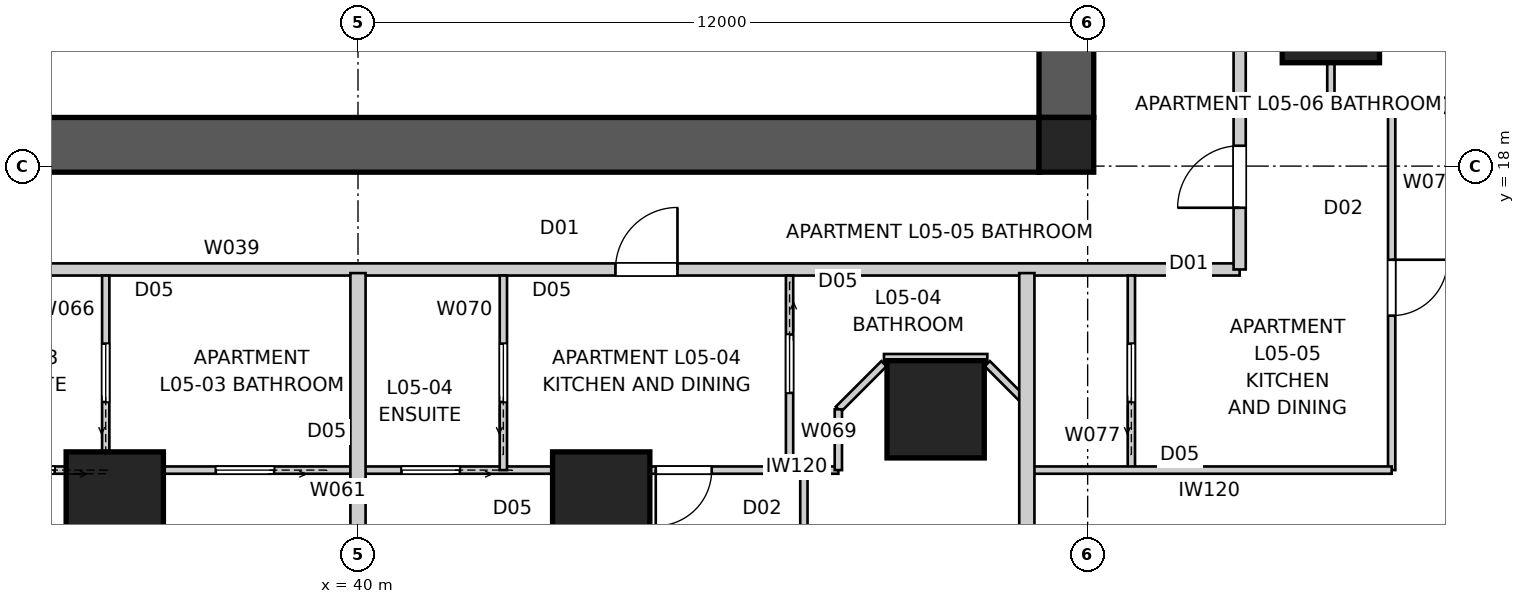
"""IFC4 building model, lengths in metres.
Left out: names, types, materials, properties, quantities, classifications, styles, units other than length and angle.
Written with IfcOpenShell. Run it as: python <this file> out.ifc"""

import sys

from ifc_helpers import new_model, si_unit, direction, frame, frame_2d, origin, origin_2d, place, context, subcontext, project, spatial, polyline, rectangle, outline, extrude, element, fill, save


model = new_model("IFC4")
c1 = context("Model", 3, precision=1e-05, world=origin(), true_north=direction((0.0, 1.0)))
c2 = subcontext(c1, "Body", "Model", "MODEL_VIEW")
j1 = project(units=[si_unit("LENGTHUNIT", "METRE"), si_unit("PLANEANGLEUNIT", "RADIAN")], contexts=[c1])
p1 = place(None, origin())
s1 = spatial("IfcSite", under=j1, at=p1, CompositionType="ELEMENT")
p2 = place(p1, origin())
s2 = spatial("IfcBuilding", under=s1, at=p2, CompositionType="ELEMENT")
p3 = place(p2, frame((0.0, 0.0, 21.8)))
s3 = spatial("IfcBuildingStorey", under=s2, at=p3, CompositionType="ELEMENT", Elevation=21.8)
p4 = place(p3, frame((51.2, 18.35, 0.0), z_axis=(0.0, 0.0, 1.0), x_axis=(-1.0, 0.0, 0.0)))
e1 = element("IfcWall", 1, at=p4, inside=s3, PredefinedType="SHEAR", context=c2, shape_type="SweptSolid", body=[
    extrude(outline(polyline([(0.0, -0.45), (22.4, -0.45), (22.4, -0.025), (22.85, -0.025), (22.85, 0.025), (22.4, 0.025), (22.4, 0.45), (0.0, 0.45), (0.0, 0.025), (-0.45, 0.025), (-0.45, -0.025), (0.0, -0.025), (0.0, -0.45)])), origin(), (0.0, 0.0, 1.0), 3.4),
])
p5 = place(p3, frame((51.65, 18.8, 0.0), z_axis=(0.0, 0.0, 1.0), x_axis=(0.0, 1.0, 0.0)))
e2 = element("IfcWall", 2, at=p5, inside=s3, PredefinedType="SHEAR", context=c2, shape_type="SweptSolid", body=[
    extrude(outline(polyline([(0.0, -0.45), (22.4, -0.45), (22.4, -0.025), (22.85, -0.025), (22.85, 0.025), (22.4, 0.025), (22.4, 0.45), (0.0, 0.45), (0.0, 0.025), (-0.45, 0.025), (-0.45, -0.025), (0.0, -0.025), (0.0, -0.45)])), origin(), (0.0, 0.0, 1.0), 3.4),
])
p6 = place(p5, frame((11.14, 0.0, 0.0)))
e3 = element("IfcOpeningElement", 3, at=p6, cuts=e2, PredefinedType="OPENING", context=c2, shape_type="SweptSolid", body=[
    extrude(rectangle(XDim=1.02, YDim=2.4, at=frame_2d((0.51, 1.2))), frame((0.0, 0.46, 0.0), z_axis=(0.0, -1.0, 0.0), x_axis=(1.0, 0.0, 0.0)), (0.0, 0.0, 1.0), 0.92),
])
p7 = place(p3, frame((51.65, 18.35, 0.0), z_axis=(0.0, 0.0, 1.0), x_axis=(1.0, 0.0, 0.0)))
e4 = element("IfcColumn", 4, at=p7, inside=s3, PredefinedType="COLUMN", context=c2, shape_type="SweptSolid", body=[
    extrude(rectangle(XDim=0.9, YDim=0.9, at=origin_2d()), origin(), (0.0, 0.0, 1.0), 3.4),
])
for number, where, z_axis, x_axis in (
    (5, (36.0, 12.5, 0.0), (0.0, 0.0, 1.0), (1.0, 0.0, 0.0)),
    (6, (44.0, 12.5, 0.0), (0.0, 0.0, 1.0), (1.0, 0.0, 0.0)),
    (7, (49.5, 14.0, 0.0), (0.0, 0.0, 1.0), (1.0, 0.0, 0.0)),
    (8, (56.0, 20.5, 0.0), (0.0, 0.0, 1.0), (1.0, 0.0, 0.0)),
):
    element("IfcColumn", number, at=place(p3, frame(where, z_axis=z_axis, x_axis=x_axis)), inside=s3, PredefinedType="COLUMN", context=c2, shape_type="SweptSolid", body=[
        extrude(rectangle(XDim=1.6, YDim=1.6, at=origin_2d()), origin(), (0.0, 0.0, 1.0), 3.4),
    ])
p8 = place(p3, frame((25.5, 16.3, 0.0), z_axis=(0.0, 0.0, 1.0), x_axis=(1.0, 0.0, 0.0)))
e9 = element("IfcWall", 9, at=p8, inside=s3, PredefinedType="PARTITIONING", context=c2, shape_type="SweptSolid", body=[
    extrude(rectangle(XDim=29.0, YDim=0.2, at=frame_2d((14.5, 0.0))), origin(), (0.0, 0.0, 1.0), 3.25),
])
p9 = place(p8, frame((18.734, 0.0, 0.0)))
e10 = element("IfcOpeningElement", 10, at=p9, cuts=e9, PredefinedType="OPENING", context=c2, shape_type="SweptSolid", body=[
    extrude(rectangle(XDim=1.02, YDim=2.34, at=frame_2d((0.51, 1.17))), frame((0.0, 0.11, 0.0), z_axis=(0.0, -1.0, 0.0), x_axis=(1.0, 0.0, 0.0)), (0.0, 0.0, 1.0), 0.22),
])
p10 = place(p8, frame((5.096, 0.0, 0.0)))
e11 = element("IfcOpeningElement", 11, at=p10, cuts=e9, PredefinedType="OPENING", context=c2, shape_type="SweptSolid", body=[
    extrude(rectangle(XDim=1.02, YDim=2.34, at=frame_2d((0.51, 1.17))), frame((0.0, 0.11, 0.0), z_axis=(0.0, -1.0, 0.0), x_axis=(1.0, 0.0, 0.0)), (0.0, 0.0, 1.0), 0.22),
])
p11 = place(p3, frame((54.5, 16.3, 0.0), z_axis=(0.0, 0.0, 1.0), x_axis=(0.0, 1.0, 0.0)))
e12 = element("IfcWall", 12, at=p11, inside=s3, PredefinedType="PARTITIONING", context=c2, shape_type="SweptSolid", body=[
    extrude(rectangle(XDim=27.4, YDim=0.2, at=frame_2d((13.7, 0.0))), origin(), (0.0, 0.0, 1.0), 3.25),
])
p12 = place(p11, frame((20.998, 0.0, 0.0)))
e13 = element("IfcOpeningElement", 13, at=p12, cuts=e12, PredefinedType="OPENING", context=c2, shape_type="SweptSolid", body=[
    extrude(rectangle(XDim=1.02, YDim=2.34, at=frame_2d((0.51, 1.17))), frame((0.0, 0.11, 0.0), z_axis=(0.0, -1.0, 0.0), x_axis=(1.0, 0.0, 0.0)), (0.0, 0.0, 1.0), 0.22),
])
p13 = place(p11, frame((11.119, 0.0, 0.0)))
e14 = element("IfcOpeningElement", 14, at=p13, cuts=e12, PredefinedType="OPENING", context=c2, shape_type="SweptSolid", body=[
    extrude(rectangle(XDim=1.02, YDim=2.34, at=frame_2d((0.51, 1.17))), frame((0.0, 0.11, 0.0), z_axis=(0.0, -1.0, 0.0), x_axis=(1.0, 0.0, 0.0)), (0.0, 0.0, 1.0), 0.22),
])
p14 = place(p11, frame((1.015, 0.0, 0.0)))
e15 = element("IfcOpeningElement", 15, at=p14, cuts=e12, PredefinedType="OPENING", context=c2, shape_type="SweptSolid", body=[
    extrude(rectangle(XDim=1.02, YDim=2.34, at=frame_2d((0.51, 1.17))), frame((0.0, 0.11, 0.0), z_axis=(0.0, -1.0, 0.0), x_axis=(1.0, 0.0, 0.0)), (0.0, 0.0, 1.0), 0.22),
])
p15 = place(p3, frame((40.0, 4.0, 0.0), z_axis=(0.0, 0.0, 1.0), x_axis=(0.0, 1.0, 0.0)))
e16 = element("IfcWall", 16, at=p15, inside=s3, PredefinedType="PARTITIONING", context=c2, shape_type="SweptSolid", body=[
    extrude(rectangle(XDim=8.5, YDim=0.25, at=frame_2d((4.25, 0.0))), origin(), (0.0, 0.0, 1.0), 3.25),
])
p16 = place(p3, frame((40.0, 12.5, 0.0), z_axis=(0.0, 0.0, 1.0), x_axis=(0.0, 1.0, 0.0)))
e17 = element("IfcWall", 17, at=p16, inside=s3, PredefinedType="PARTITIONING", context=c2, shape_type="SweptSolid", body=[
    extrude(rectangle(XDim=3.74, YDim=0.25, at=frame_2d((1.87, 0.0))), origin(), (0.0, 0.0, 1.0), 2.796),
])
p17 = place(p3, frame((51.0, 4.0, 0.0), z_axis=(0.0, 0.0, 1.0), x_axis=(0.0, 1.0, 0.0)))
e18 = element("IfcWall", 18, at=p17, inside=s3, PredefinedType="PARTITIONING", context=c2, shape_type="SweptSolid", body=[
    extrude(rectangle(XDim=12.24, YDim=0.25, at=frame_2d((6.12, 0.0))), origin(), (0.0, 0.0, 1.0), 3.25),
])
p18 = place(p3, frame((66.0, 19.0, 0.0), z_axis=(0.0, 0.0, 1.0), x_axis=(-1.0, 0.0, 0.0)))
e19 = element("IfcWall", 19, at=p18, inside=s3, PredefinedType="PARTITIONING", context=c2, shape_type="SweptSolid", body=[
    extrude(rectangle(XDim=11.44, YDim=0.25, at=frame_2d((5.72, 0.0))), origin(), (0.0, 0.0, 1.0), 3.25),
])
p19 = place(p3, frame((47.9, 13.0, 0.0), z_axis=(0.0, 0.0, 1.0), x_axis=(-1.0, 0.0, 0.0)))
e20 = element("IfcWall", 20, at=p19, inside=s3, PredefinedType="PARTITIONING", context=c2, shape_type="SweptSolid", body=[
    extrude(rectangle(XDim=15.8, YDim=0.12, at=frame_2d((7.9, 0.0))), origin(), (0.0, 0.0, 1.0), 2.549),
])
p20 = place(p19, frame((2.083, 0.0, 0.0)))
e21 = element("IfcOpeningElement", 21, at=p20, cuts=e20, PredefinedType="OPENING", context=c2, shape_type="SweptSolid", body=[
    extrude(rectangle(XDim=0.92, YDim=2.34, at=frame_2d((0.46, 1.17))), frame((0.0, 0.07, 0.0), z_axis=(0.0, -1.0, 0.0), x_axis=(1.0, 0.0, 0.0)), (0.0, 0.0, 1.0), 0.14),
])
p21 = place(p19, frame((6.225, 0.0, 0.0)))
e22 = element("IfcOpeningElement", 22, at=p21, cuts=e20, PredefinedType="OPENING", context=c2, shape_type="SweptSolid", body=[
    extrude(rectangle(XDim=0.96, YDim=2.1, at=frame_2d((0.48, 1.05))), frame((0.0, 0.07, 0.0), z_axis=(0.0, -1.0, 0.0), x_axis=(1.0, 0.0, 0.0)), (0.0, 0.0, 1.0), 0.14),
])
p22 = place(p19, frame((12.888, 0.0, 0.0)))
e23 = element("IfcOpeningElement", 23, at=p22, cuts=e20, PredefinedType="OPENING", context=c2, shape_type="SweptSolid", body=[
    extrude(rectangle(XDim=0.96, YDim=2.1, at=frame_2d((0.48, 1.05))), frame((0.0, 0.07, 0.0), z_axis=(0.0, -1.0, 0.0), x_axis=(1.0, 0.0, 0.0)), (0.0, 0.0, 1.0), 0.14),
])
p23 = place(p19, frame((9.278, 0.0, 0.0)))
e24 = element("IfcOpeningElement", 24, at=p23, cuts=e20, PredefinedType="OPENING", context=c2, shape_type="SweptSolid", body=[
    extrude(rectangle(XDim=0.96, YDim=2.1, at=frame_2d((0.48, 1.05))), frame((0.0, 0.07, 0.0), z_axis=(0.0, -1.0, 0.0), x_axis=(1.0, 0.0, 0.0)), (0.0, 0.0, 1.0), 0.14),
])
p24 = place(p3, frame((35.851, 13.0, 0.0), z_axis=(0.0, 0.0, 1.0), x_axis=(0.0, 1.0, 0.0)))
e25 = element("IfcWall", 25, at=p24, inside=s3, PredefinedType="PARTITIONING", context=c2, shape_type="SweptSolid", body=[
    extrude(rectangle(XDim=3.2, YDim=0.12, at=frame_2d((1.6, 0.0))), origin(), (0.0, 0.0, 1.0), 3.25),
])
p25 = place(p24, frame((1.12, 0.0, 0.0)))
e26 = element("IfcOpeningElement", 26, at=p25, cuts=e25, PredefinedType="OPENING", context=c2, shape_type="SweptSolid", body=[
    extrude(rectangle(XDim=0.96, YDim=2.1, at=frame_2d((0.48, 1.05))), frame((0.0, 0.07, 0.0), z_axis=(0.0, -1.0, 0.0), x_axis=(1.0, 0.0, 0.0)), (0.0, 0.0, 1.0), 0.14),
])
p26 = place(p3, frame((36.333, 4.04, 0.0), z_axis=(0.0, 0.0, 1.0), x_axis=(0.0, 1.0, 0.0)))
e27 = element("IfcWall", 27, at=p26, inside=s3, PredefinedType="PARTITIONING", context=c2, shape_type="SweptSolid", body=[
    extrude(rectangle(XDim=8.96, YDim=0.12, at=frame_2d((4.48, 0.0))), origin(), (0.0, 0.0, 1.0), 3.25),
])
p27 = place(p3, frame((47.098, 16.2, 0.0), z_axis=(0.0, 0.0, 1.0), x_axis=(0.0, -1.0, 0.0)))
e28 = element("IfcWall", 28, at=p27, inside=s3, PredefinedType="PARTITIONING", context=c2, shape_type="SweptSolid", body=[
    extrude(rectangle(XDim=3.2, YDim=0.12, at=frame_2d((1.6, 0.0))), origin(), (0.0, 0.0, 1.0), 3.25),
])
p28 = place(p27, frame((0.97, 0.0, 0.0)))
e29 = element("IfcOpeningElement", 29, at=p28, cuts=e28, PredefinedType="OPENING", context=c2, shape_type="SweptSolid", body=[
    extrude(rectangle(XDim=0.96, YDim=2.1, at=frame_2d((0.48, 1.05))), frame((0.0, 0.07, 0.0), z_axis=(0.0, -1.0, 0.0), x_axis=(1.0, 0.0, 0.0)), (0.0, 0.0, 1.0), 0.14),
])
p29 = place(p3, frame((42.391, 13.0, 0.0), z_axis=(0.0, 0.0, 1.0), x_axis=(0.0, 1.0, 0.0)))
e30 = element("IfcWall", 30, at=p29, inside=s3, PredefinedType="PARTITIONING", context=c2, shape_type="SweptSolid", body=[
    extrude(rectangle(XDim=3.2, YDim=0.12, at=frame_2d((1.6, 0.0))), origin(), (0.0, 0.0, 1.0), 3.25),
])
p30 = place(p29, frame((1.12, 0.0, 0.0)))
e31 = element("IfcOpeningElement", 31, at=p30, cuts=e30, PredefinedType="OPENING", context=c2, shape_type="SweptSolid", body=[
    extrude(rectangle(XDim=0.96, YDim=2.1, at=frame_2d((0.48, 1.05))), frame((0.0, 0.07, 0.0), z_axis=(0.0, -1.0, 0.0), x_axis=(1.0, 0.0, 0.0)), (0.0, 0.0, 1.0), 0.14),
])
p31 = place(p3, frame((51.0, 14.1, 0.0), z_axis=(0.0, 0.0, 1.0), x_axis=(-0.707106781187, 0.707106781187, 0.0)))
e32 = element("IfcWall", 32, at=p31, inside=s3, PredefinedType="PARTITIONING", context=c2, shape_type="SweptSolid", body=[
    extrude(rectangle(XDim=0.919, YDim=0.12, at=frame_2d((0.459, 0.0))), origin(), (0.0, 0.0, 1.0), 3.25),
])
p32 = place(p3, frame((50.35, 14.85, 0.0), z_axis=(0.0, 0.0, 1.0), x_axis=(-1.0, 0.0, 0.0)))
e33 = element("IfcWall", 33, at=p32, inside=s3, PredefinedType="PARTITIONING", context=c2, shape_type="SweptSolid", body=[
    extrude(rectangle(XDim=1.7, YDim=0.12, at=frame_2d((0.85, 0.0))), origin(), (0.0, 0.0, 1.0), 3.25),
])
p33 = place(p3, frame((48.65, 14.75, 0.0), z_axis=(0.0, 0.0, 1.0), x_axis=(-0.707106781187, -0.707106781187, 0.0)))
e34 = element("IfcWall", 34, at=p33, inside=s3, PredefinedType="PARTITIONING", context=c2, shape_type="SweptSolid", body=[
    extrude(rectangle(XDim=1.061, YDim=0.12, at=frame_2d((0.53, 0.0))), origin(), (0.0, 0.0, 1.0), 3.25),
])
p34 = place(p3, frame((47.9, 14.0, 0.0), z_axis=(0.0, 0.0, 1.0), x_axis=(0.0, -1.0, 0.0)))
e35 = element("IfcWall", 35, at=p34, inside=s3, PredefinedType="PARTITIONING", context=c2, shape_type="SweptSolid", body=[
    extrude(rectangle(XDim=1.0, YDim=0.12, at=frame_2d((0.5, 0.0))), origin(), (0.0, 0.0, 1.0), 3.25),
])
p35 = place(p3, frame((43.667, 13.0, 0.0), z_axis=(0.0, 0.0, 1.0), x_axis=(0.0, -1.0, 0.0)))
e36 = element("IfcWall", 36, at=p35, inside=s3, PredefinedType="PARTITIONING", context=c2, shape_type="SweptSolid", body=[
    extrude(rectangle(XDim=8.96, YDim=0.12, at=frame_2d((4.48, 0.0))), origin(), (0.0, 0.0, 1.0), 3.25),
])
p36 = place(p3, frame((47.333, 4.04, 0.0), z_axis=(0.0, 0.0, 1.0), x_axis=(0.0, 1.0, 0.0)))
e37 = element("IfcWall", 37, at=p36, inside=s3, PredefinedType="PARTITIONING", context=c2, shape_type="SweptSolid", body=[
    extrude(rectangle(XDim=8.96, YDim=0.12, at=frame_2d((4.48, 0.0))), origin(), (0.0, 0.0, 1.0), 3.25),
])
p37 = place(p36, frame((4.0, 0.0, 0.0)))
e38 = element("IfcOpeningElement", 38, at=p37, cuts=e37, PredefinedType="OPENING", context=c2, shape_type="SweptSolid", body=[
    extrude(rectangle(XDim=0.92, YDim=2.34, at=frame_2d((0.46, 1.17))), frame((0.0, 0.07, 0.0), z_axis=(0.0, -1.0, 0.0), x_axis=(1.0, 0.0, 0.0)), (0.0, 0.0, 1.0), 0.14),
])
p38 = place(p3, frame((52.719, 13.0, 0.0), z_axis=(0.0, 0.0, 1.0), x_axis=(0.0, 1.0, 0.0)))
e39 = element("IfcWall", 39, at=p38, inside=s3, PredefinedType="PARTITIONING", context=c2, shape_type="SweptSolid", body=[
    extrude(rectangle(XDim=3.2, YDim=0.12, at=frame_2d((1.6, 0.0))), origin(), (0.0, 0.0, 1.0), 3.25),
])
p39 = place(p38, frame((1.12, 0.0, 0.0)))
e40 = element("IfcOpeningElement", 40, at=p39, cuts=e39, PredefinedType="OPENING", context=c2, shape_type="SweptSolid", body=[
    extrude(rectangle(XDim=0.96, YDim=2.1, at=frame_2d((0.48, 1.05))), frame((0.0, 0.07, 0.0), z_axis=(0.0, -1.0, 0.0), x_axis=(1.0, 0.0, 0.0)), (0.0, 0.0, 1.0), 0.14),
])
p40 = place(p3, frame((57.0, 19.0, 0.0), z_axis=(0.0, 0.0, 1.0), x_axis=(0.0, -1.0, 0.0)))
e41 = element("IfcWall", 41, at=p40, inside=s3, PredefinedType="PARTITIONING", context=c2, shape_type="SweptSolid", body=[
    extrude(rectangle(XDim=6.0, YDim=0.12, at=frame_2d((3.0, 0.0))), origin(), (0.0, 0.0, 1.0), 3.25),
])
p41 = place(p40, frame((2.54, 0.0, 0.0)))
e42 = element("IfcOpeningElement", 42, at=p41, cuts=e41, PredefinedType="OPENING", context=c2, shape_type="SweptSolid", body=[
    extrude(rectangle(XDim=0.92, YDim=2.34, at=frame_2d((0.46, 1.17))), frame((0.0, 0.07, 0.0), z_axis=(0.0, -1.0, 0.0), x_axis=(1.0, 0.0, 0.0)), (0.0, 0.0, 1.0), 0.14),
])
p42 = place(p3, frame((57.0, 13.0, 0.0), z_axis=(0.0, 0.0, 1.0), x_axis=(-1.0, 0.0, 0.0)))
e43 = element("IfcWall", 43, at=p42, inside=s3, PredefinedType="PARTITIONING", context=c2, shape_type="SweptSolid", body=[
    extrude(rectangle(XDim=6.0, YDim=0.12, at=frame_2d((3.0, 0.0))), origin(), (0.0, 0.0, 1.0), 3.25),
])
p43 = place(p3, frame((56.0, 22.649, 0.0), z_axis=(0.0, 0.0, 1.0), x_axis=(0.0, -1.0, 0.0)))
e44 = element("IfcWall", 44, at=p43, inside=s3, PredefinedType="PARTITIONING", context=c2, shape_type="SweptSolid", body=[
    extrude(rectangle(XDim=3.649, YDim=0.12, at=frame_2d((1.824, 0.0))), origin(), (0.0, 0.0, 1.0), 2.549),
])
p44 = place(p9, origin())
e45 = element("IfcDoor", 45, at=p44, inside=s3, OperationType="SINGLE_SWING_RIGHT", PredefinedType="DOOR", context=c2, shape_type="SweptSolid", body=[
    extrude(rectangle(XDim=1.02, YDim=2.34, at=frame_2d((0.51, 1.17))), frame((0.0, 0.025, 0.0), z_axis=(0.0, -1.0, 0.0), x_axis=(1.0, 0.0, 0.0)), (0.0, 0.0, 1.0), 0.05),
])
fill(e10, e45)
p45 = place(p14, origin())
e46 = element("IfcDoor", 46, at=p45, inside=s3, OperationType="SINGLE_SWING_LEFT", PredefinedType="DOOR", context=c2, shape_type="SweptSolid", body=[
    extrude(rectangle(XDim=1.02, YDim=2.34, at=frame_2d((0.51, 1.17))), frame((0.0, 0.025, 0.0), z_axis=(0.0, -1.0, 0.0), x_axis=(1.0, 0.0, 0.0)), (0.0, 0.0, 1.0), 0.05),
])
fill(e15, e46)
p46 = place(p20, origin())
e47 = element("IfcDoor", 47, at=p46, inside=s3, OperationType="SINGLE_SWING_RIGHT", PredefinedType="DOOR", context=c2, shape_type="SweptSolid", body=[
    extrude(rectangle(XDim=0.92, YDim=2.34, at=frame_2d((0.46, 1.17))), frame((0.0, 0.025, 0.0), z_axis=(0.0, -1.0, 0.0), x_axis=(1.0, 0.0, 0.0)), (0.0, 0.0, 1.0), 0.05),
])
fill(e21, e47)
p47 = place(p28, origin())
e48 = element("IfcDoor", 48, at=p47, inside=s3, OperationType="SLIDING_TO_LEFT", PredefinedType="DOOR", context=c2, shape_type="SweptSolid", body=[
    extrude(rectangle(XDim=0.96, YDim=2.1, at=frame_2d((0.48, 1.05))), frame((0.0, 0.025, 0.0), z_axis=(0.0, -1.0, 0.0), x_axis=(1.0, 0.0, 0.0)), (0.0, 0.0, 1.0), 0.05),
])
fill(e29, e48)
p48 = place(p30, origin())
e49 = element("IfcDoor", 49, at=p48, inside=s3, OperationType="SLIDING_TO_LEFT", PredefinedType="DOOR", context=c2, shape_type="SweptSolid", body=[
    extrude(rectangle(XDim=0.96, YDim=2.1, at=frame_2d((0.48, 1.05))), frame((0.0, 0.025, 0.0), z_axis=(0.0, -1.0, 0.0), x_axis=(1.0, 0.0, 0.0)), (0.0, 0.0, 1.0), 0.05),
])
fill(e31, e49)
p49 = place(p41, origin())
e50 = element("IfcDoor", 50, at=p49, inside=s3, OperationType="SINGLE_SWING_LEFT", PredefinedType="DOOR", context=c2, shape_type="SweptSolid", body=[
    extrude(rectangle(XDim=0.92, YDim=2.34, at=frame_2d((0.46, 1.17))), frame((0.0, 0.025, 0.0), z_axis=(0.0, -1.0, 0.0), x_axis=(1.0, 0.0, 0.0)), (0.0, 0.0, 1.0), 0.05),
])
fill(e42, e50)
p50 = place(p39, origin())
e51 = element("IfcDoor", 51, at=p50, inside=s3, OperationType="SLIDING_TO_LEFT", PredefinedType="DOOR", context=c2, shape_type="SweptSolid", body=[
    extrude(rectangle(XDim=0.96, YDim=2.1, at=frame_2d((0.48, 1.05))), frame((0.0, 0.025, 0.0), z_axis=(0.0, -1.0, 0.0), x_axis=(1.0, 0.0, 0.0)), (0.0, 0.0, 1.0), 0.05),
])
fill(e40, e51)
p51 = place(p21, origin())
e52 = element("IfcDoor", 52, at=p51, inside=s3, OperationType="SLIDING_TO_LEFT", PredefinedType="DOOR", context=c2, shape_type="SweptSolid", body=[
    extrude(rectangle(XDim=0.96, YDim=2.1, at=frame_2d((0.48, 1.05))), frame((0.0, 0.025, 0.0), z_axis=(0.0, -1.0, 0.0), x_axis=(1.0, 0.0, 0.0)), (0.0, 0.0, 1.0), 0.05),
])
fill(e22, e52)
p52 = place(p25, origin())
e53 = element("IfcDoor", 53, at=p52, inside=s3, OperationType="SLIDING_TO_LEFT", PredefinedType="DOOR", context=c2, shape_type="SweptSolid", body=[
    extrude(rectangle(XDim=0.96, YDim=2.1, at=frame_2d((0.48, 1.05))), frame((0.0, 0.025, 0.0), z_axis=(0.0, -1.0, 0.0), x_axis=(1.0, 0.0, 0.0)), (0.0, 0.0, 1.0), 0.05),
])
fill(e26, e53)
p53 = place(p22, origin())
e54 = element("IfcDoor", 54, at=p53, inside=s3, OperationType="SLIDING_TO_LEFT", PredefinedType="DOOR", context=c2, shape_type="SweptSolid", body=[
    extrude(rectangle(XDim=0.96, YDim=2.1, at=frame_2d((0.48, 1.05))), frame((0.0, 0.025, 0.0), z_axis=(0.0, -1.0, 0.0), x_axis=(1.0, 0.0, 0.0)), (0.0, 0.0, 1.0), 0.05),
])
fill(e23, e54)
p54 = place(p23, origin())
e55 = element("IfcDoor", 55, at=p54, inside=s3, OperationType="SLIDING_TO_LEFT", PredefinedType="DOOR", context=c2, shape_type="SweptSolid", body=[
    extrude(rectangle(XDim=0.96, YDim=2.1, at=frame_2d((0.48, 1.05))), frame((0.0, 0.025, 0.0), z_axis=(0.0, -1.0, 0.0), x_axis=(1.0, 0.0, 0.0)), (0.0, 0.0, 1.0), 0.05),
])
fill(e24, e55)
save(model, sys.argv[1])
